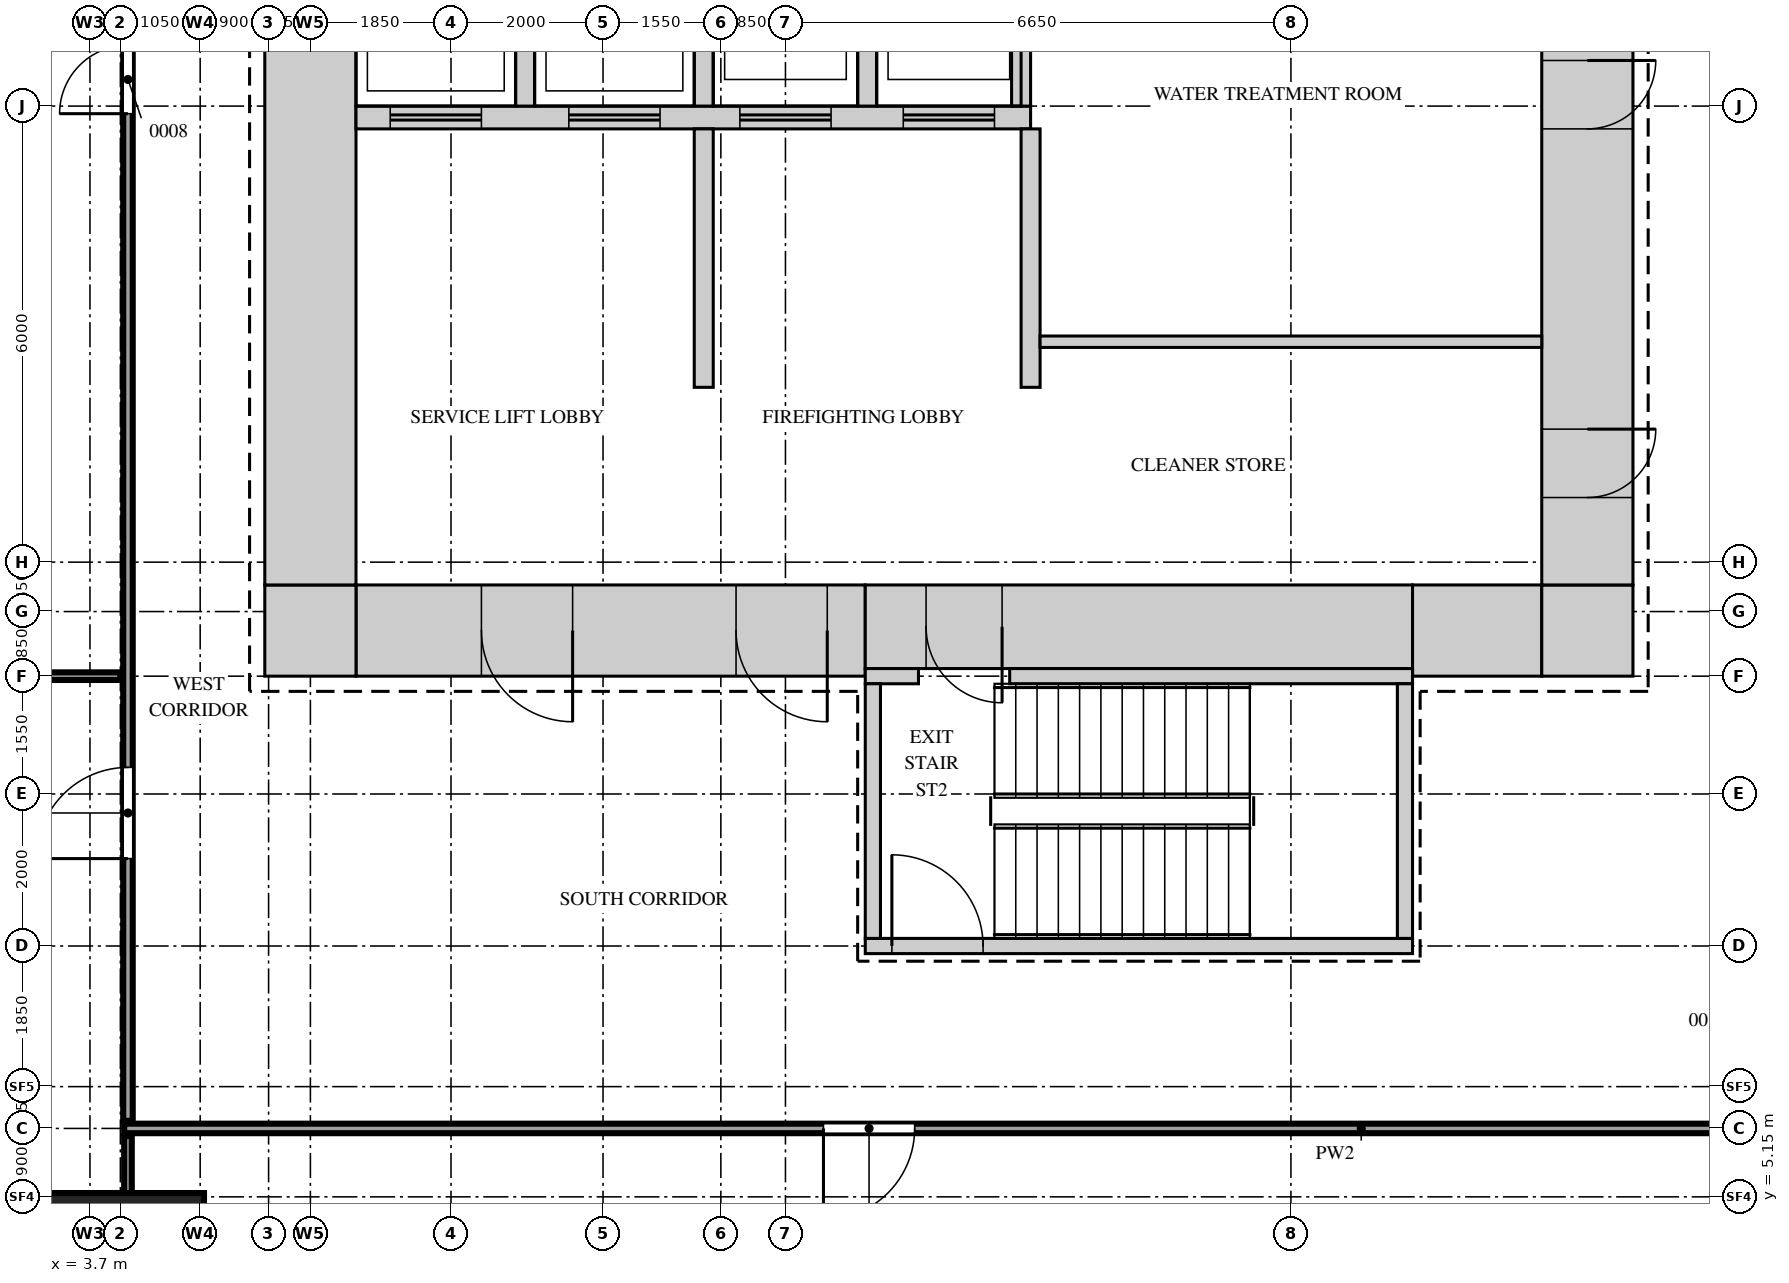
"""IFC4 building model, lengths in metres.
Left out: names, types, materials, properties, quantities, classifications, styles, units other than length and angle.
Written with IfcOpenShell. Run it as: python <this file> out.ifc"""

import sys

from ifc_helpers import new_model, si_unit, direction, frame, frame_2d, origin, origin_2d, place, context, subcontext, project, spatial, rectangle, extrude, source, transform, mapped, element, fill, save


model = new_model("IFC4")
c1 = context("Model", 3, precision=1e-05, world=origin(), true_north=direction((0.0, 1.0)))
c2 = subcontext(c1, "Body", "Model", "MODEL_VIEW")
j1 = project(units=[si_unit("LENGTHUNIT", "METRE"), si_unit("PLANEANGLEUNIT", "RADIAN")], contexts=[c1])
p1 = place(None, origin())
s1 = spatial("IfcSite", under=j1, at=p1, CompositionType="ELEMENT")
p2 = place(p1, origin())
s2 = spatial("IfcBuilding", under=s1, at=p2, CompositionType="ELEMENT")
p3 = place(p2, frame((0.0, 0.0, 73.5)))
s3 = spatial("IfcBuildingStorey", under=s2, at=p3, CompositionType="ELEMENT", Elevation=73.5)
m1 = source(origin(), c2, "Body", "SweptSolid", [
    extrude(rectangle(XDim=6.7, YDim=1.2, at=frame_2d((3.35, 0.0))), origin(), (0.0, 0.0, 1.0), 4.2),
])
p4 = place(p3, frame((7.2, 12.6, 0.0), z_axis=(0.0, 0.0, 1.0), x_axis=(1.0, 0.0, 0.0)))
e1 = element("IfcWall", 1, at=p4, inside=s3, PredefinedType="SHEAR", context=c2, shape_type="MappedRepresentation", body=[
    mapped(m1, transform((0.0, 0.0, 0.0))),
])
m2 = source(origin(), c2, "Body", "SweptSolid", [
    extrude(rectangle(XDim=1.2, YDim=2.1, at=frame_2d((0.6, 1.05))), frame((0.0, 0.61, 0.0), z_axis=(0.0, -1.0, 0.0), x_axis=(1.0, 0.0, 0.0)), (0.0, 0.0, 1.0), 1.22),
])
p5 = place(p4, frame((5.0, 0.0, 0.0)))
e2 = element("IfcOpeningElement", 2, at=p5, cuts=e1, PredefinedType="OPENING", context=c2, shape_type="MappedRepresentation", body=[
    mapped(m2, transform((0.0, 0.0, 0.0))),
])
p6 = place(p4, frame((1.65, 0.0, 0.0)))
e3 = element("IfcOpeningElement", 3, at=p6, cuts=e1, PredefinedType="OPENING", context=c2, shape_type="MappedRepresentation", body=[
    mapped(m2, transform((0.0, 0.0, 0.0))),
])
m3 = source(origin(), c2, "Body", "SweptSolid", [
    extrude(rectangle(XDim=7.2, YDim=1.1, at=frame_2d((3.6, 0.0))), origin(), (0.0, 0.0, 1.0), 4.2),
])
p7 = place(p3, frame((13.9, 12.65, 0.0), z_axis=(0.0, 0.0, 1.0), x_axis=(1.0, 0.0, 0.0)))
e4 = element("IfcWall", 4, at=p7, inside=s3, PredefinedType="SHEAR", context=c2, shape_type="MappedRepresentation", body=[
    mapped(m3, transform((0.0, 0.0, 0.0))),
])
m4 = source(origin(), c2, "Body", "SweptSolid", [
    extrude(rectangle(XDim=1.0, YDim=2.1, at=frame_2d((0.5, 1.05))), frame((0.0, 0.56, 0.0), z_axis=(0.0, -1.0, 0.0), x_axis=(1.0, 0.0, 0.0)), (0.0, 0.0, 1.0), 1.12),
])
p8 = place(p7, frame((0.8, 0.0, 0.0)))
e5 = element("IfcOpeningElement", 5, at=p8, cuts=e4, PredefinedType="OPENING", context=c2, shape_type="MappedRepresentation", body=[
    mapped(m4, transform((0.0, 0.0, 0.0))),
])
m5 = source(origin(), c2, "Body", "SweptSolid", [
    extrude(rectangle(XDim=1.7, YDim=1.2, at=frame_2d((0.85, 0.0))), origin(), (0.0, 0.0, 1.0), 4.2),
])
p9 = place(p3, frame((21.1, 12.6, 0.0), z_axis=(0.0, 0.0, 1.0), x_axis=(1.0, 0.0, 0.0)))
e6 = element("IfcWall", 6, at=p9, inside=s3, PredefinedType="SHEAR", context=c2, shape_type="MappedRepresentation", body=[
    mapped(m5, transform((0.0, 0.0, 0.0))),
])
m6 = source(origin(), c2, "Body", "SweptSolid", [
    extrude(rectangle(XDim=1.2, YDim=1.2, at=frame_2d((0.6, 0.0))), origin(), (0.0, 0.0, 1.0), 4.2),
])
for number, where, z_axis, x_axis in (
    (7, (22.8, 12.6, 0.0), (0.0, 0.0, 1.0), (1.0, 0.0, 0.0)),
    (8, (6.0, 12.6, 0.0), (0.0, 0.0, 1.0), (1.0, 0.0, 0.0)),
):
    element("IfcWall", number, at=place(p3, frame(where, z_axis=z_axis, x_axis=x_axis)), inside=s3, PredefinedType="SHEAR", context=c2, shape_type="MappedRepresentation", body=[
        mapped(m6, transform((0.0, 0.0, 0.0))),
    ])
m7 = source(origin(), c2, "Body", "SweptSolid", [
    extrude(rectangle(XDim=27.6, YDim=1.2, at=frame_2d((13.8, 0.0))), origin(), (0.0, 0.0, 1.0), 4.2),
])
p10 = place(p3, frame((23.4, 13.2, 0.0), z_axis=(0.0, 0.0, 1.0), x_axis=(0.0, 1.0, 0.0)))
e9 = element("IfcWall", 9, at=p10, inside=s3, PredefinedType="SHEAR", context=c2, shape_type="MappedRepresentation", body=[
    mapped(m7, transform((0.0, 0.0, 0.0))),
])
m8 = source(origin(), c2, "Body", "SweptSolid", [
    extrude(rectangle(XDim=1.8, YDim=2.1, at=frame_2d((0.9, 1.05))), frame((0.0, 0.61, 0.0), z_axis=(0.0, -1.0, 0.0), x_axis=(1.0, 0.0, 0.0)), (0.0, 0.0, 1.0), 1.22),
])
p11 = place(p10, frame((22.4, 0.0, 0.0)))
e10 = element("IfcOpeningElement", 10, at=p11, cuts=e9, PredefinedType="OPENING", context=c2, shape_type="MappedRepresentation", body=[
    mapped(m8, transform((0.0, 0.0, 0.0))),
])
p12 = place(p10, frame((14.4, 0.0, 0.0)))
e11 = element("IfcOpeningElement", 11, at=p12, cuts=e9, PredefinedType="OPENING", context=c2, shape_type="MappedRepresentation", body=[
    mapped(m2, transform((0.0, 0.0, 0.0))),
])
m9 = source(origin(), c2, "Body", "SweptSolid", [
    extrude(rectangle(XDim=0.9, YDim=2.1, at=frame_2d((0.45, 1.05))), frame((0.0, 0.61, 0.0), z_axis=(0.0, -1.0, 0.0), x_axis=(1.0, 0.0, 0.0)), (0.0, 0.0, 1.0), 1.22),
])
p13 = place(p10, frame((1.15, 0.0, 0.0)))
e12 = element("IfcOpeningElement", 12, at=p13, cuts=e9, PredefinedType="OPENING", context=c2, shape_type="MappedRepresentation", body=[
    mapped(m9, transform((0.0, 0.0, 0.0))),
])
p14 = place(p10, frame((6.0, 0.0, 0.0)))
e13 = element("IfcOpeningElement", 13, at=p14, cuts=e9, PredefinedType="OPENING", context=c2, shape_type="MappedRepresentation", body=[
    mapped(m9, transform((0.0, 0.0, 0.0))),
])
p15 = place(p3, frame((6.6, 13.2, 0.0), z_axis=(0.0, 0.0, 1.0), x_axis=(0.0, 1.0, 0.0)))
e14 = element("IfcWall", 14, at=p15, inside=s3, PredefinedType="SHEAR", context=c2, shape_type="MappedRepresentation", body=[
    mapped(m7, transform((0.0, 0.0, 0.0))),
])
m10 = source(origin(), c2, "Body", "SweptSolid", [
    extrude(rectangle(XDim=0.7, YDim=0.2, at=frame_2d((0.35, 0.0))), origin(), (0.0, 0.0, 1.0), 4.2),
])
p16 = place(p3, frame((13.9, 12.0, 0.0), z_axis=(0.0, 0.0, 1.0), x_axis=(1.0, 0.0, 0.0)))
e15 = element("IfcWall", 15, at=p16, inside=s3, PredefinedType="SHEAR", context=c2, shape_type="MappedRepresentation", body=[
    mapped(m10, transform((0.0, 0.0, 0.0))),
])
m11 = source(origin(), c2, "Body", "SweptSolid", [
    extrude(rectangle(XDim=5.3, YDim=0.2, at=frame_2d((2.65, 0.0))), origin(), (0.0, 0.0, 1.0), 4.2),
])
p17 = place(p3, frame((15.8, 12.0, 0.0), z_axis=(0.0, 0.0, 1.0), x_axis=(1.0, 0.0, 0.0)))
e16 = element("IfcWall", 16, at=p17, inside=s3, PredefinedType="SHEAR", context=c2, shape_type="MappedRepresentation", body=[
    mapped(m11, transform((0.0, 0.0, 0.0))),
])
m12 = source(origin(), c2, "Body", "SweptSolid", [
    extrude(rectangle(XDim=7.2, YDim=0.2, at=frame_2d((3.6, 0.0))), origin(), (0.0, 0.0, 1.0), 4.2),
])
p18 = place(p3, frame((13.9, 8.45, 0.0), z_axis=(0.0, 0.0, 1.0), x_axis=(1.0, 0.0, 0.0)))
e17 = element("IfcWall", 17, at=p18, inside=s3, PredefinedType="SHEAR", context=c2, shape_type="MappedRepresentation", body=[
    mapped(m12, transform((0.0, 0.0, 0.0))),
])
m13 = source(origin(), c2, "Body", "SweptSolid", [
    extrude(rectangle(XDim=1.2, YDim=2.1, at=frame_2d((0.6, 1.05))), frame((0.0, 0.11, 0.0), z_axis=(0.0, -1.0, 0.0), x_axis=(1.0, 0.0, 0.0)), (0.0, 0.0, 1.0), 0.22),
])
p19 = place(p18, frame((0.35, 0.0, 0.0)))
e18 = element("IfcOpeningElement", 18, at=p19, cuts=e17, PredefinedType="OPENING", context=c2, shape_type="MappedRepresentation", body=[
    mapped(m13, transform((0.0, 0.0, 0.0))),
])
m14 = source(origin(), c2, "Body", "SweptSolid", [
    extrude(rectangle(XDim=3.35, YDim=0.2, at=frame_2d((1.675, 0.0))), origin(), (0.0, 0.0, 1.0), 4.2),
])
for number, where, z_axis, x_axis in (
    (19, (21.0, 8.55, 0.0), (0.0, 0.0, 1.0), (0.0, 1.0, 0.0)),
    (20, (14.0, 8.55, 0.0), (0.0, 0.0, 1.0), (0.0, 1.0, 0.0)),
):
    element("IfcWall", number, at=place(p3, frame(where, z_axis=z_axis, x_axis=x_axis)), inside=s3, PredefinedType="SHEAR", context=c2, shape_type="MappedRepresentation", body=[
        mapped(m14, transform((0.0, 0.0, 0.0))),
    ])
m15 = source(origin(), c2, "Body", "SweptSolid", [
    extrude(rectangle(XDim=8.875, YDim=0.3, at=frame_2d((4.438, 0.0))), origin(), (0.0, 0.0, 1.0), 4.2),
])
p20 = place(p3, frame((7.2, 19.35, 0.0), z_axis=(0.0, 0.0, 1.0), x_axis=(1.0, 0.0, 0.0)))
e21 = element("IfcWall", 21, at=p20, inside=s3, PredefinedType="STANDARD", context=c2, shape_type="MappedRepresentation", body=[
    mapped(m15, transform((0.0, 0.0, 0.0))),
])
m16 = source(origin(), c2, "Body", "SweptSolid", [
    extrude(rectangle(XDim=1.2, YDim=2.1, at=frame_2d((0.6, 1.05))), frame((0.0, 0.16, 0.0), z_axis=(0.0, -1.0, 0.0), x_axis=(1.0, 0.0, 0.0)), (0.0, 0.0, 1.0), 0.32),
])
p21 = place(p20, frame((0.45, 0.0, 0.0)))
e22 = element("IfcOpeningElement", 22, at=p21, cuts=e21, PredefinedType="OPENING", context=c2, shape_type="MappedRepresentation", body=[
    mapped(m16, transform((0.0, 0.0, 0.0))),
])
p22 = place(p20, frame((2.8, 0.0, 0.0)))
e23 = element("IfcOpeningElement", 23, at=p22, cuts=e21, PredefinedType="OPENING", context=c2, shape_type="MappedRepresentation", body=[
    mapped(m16, transform((0.0, 0.0, 0.0))),
])
p23 = place(p20, frame((5.05, 0.0, 0.0)))
e24 = element("IfcOpeningElement", 24, at=p23, cuts=e21, PredefinedType="OPENING", context=c2, shape_type="MappedRepresentation", body=[
    mapped(m16, transform((0.0, 0.0, 0.0))),
])
p24 = place(p20, frame((7.2, 0.0, 0.0)))
e25 = element("IfcOpeningElement", 25, at=p24, cuts=e21, PredefinedType="OPENING", context=c2, shape_type="MappedRepresentation", body=[
    mapped(m16, transform((0.0, 0.0, 0.0))),
])
m17 = source(origin(), c2, "Body", "SweptSolid", [
    extrude(rectangle(XDim=3.1, YDim=0.25, at=frame_2d((1.55, 0.0))), origin(), (0.0, 0.0, 1.0), 4.2),
])
for number, where, z_axis, x_axis in (
    (26, (9.425, 19.5, 0.0), (0.0, 0.0, 1.0), (0.0, 1.0, 0.0)),
    (27, (11.775, 19.5, 0.0), (0.0, 0.0, 1.0), (0.0, 1.0, 0.0)),
    (28, (13.925, 19.5, 0.0), (0.0, 0.0, 1.0), (0.0, 1.0, 0.0)),
    (29, (15.95, 19.5, 0.0), (0.0, 0.0, 1.0), (0.0, 1.0, 0.0)),
):
    element("IfcWall", number, at=place(p3, frame(where, z_axis=z_axis, x_axis=x_axis)), inside=s3, PredefinedType="STANDARD", context=c2, shape_type="MappedRepresentation", body=[
        mapped(m17, transform((0.0, 0.0, 0.0))),
    ])
m18 = source(origin(), c2, "Body", "SweptSolid", [
    extrude(rectangle(XDim=3.4, YDim=0.25, at=frame_2d((1.7, 0.0))), origin(), (0.0, 0.0, 1.0), 4.2),
])
for number, where, z_axis, x_axis in (
    (30, (16.075, 15.8, 0.0), (0.0, 0.0, 1.0), (0.0, 1.0, 0.0)),
    (31, (11.775, 15.8, 0.0), (0.0, 0.0, 1.0), (0.0, 1.0, 0.0)),
):
    element("IfcWall", number, at=place(p3, frame(where, z_axis=z_axis, x_axis=x_axis)), inside=s3, PredefinedType="STANDARD", context=c2, shape_type="MappedRepresentation", body=[
        mapped(m18, transform((0.0, 0.0, 0.0))),
    ])
m19 = source(origin(), c2, "Body", "SweptSolid", [
    extrude(rectangle(XDim=2.2, YDim=2.2, at=origin_2d()), origin(), (0.0, 0.0, 1.0), 4.5),
])
p25 = place(p3, frame((4.1, 4.1, 0.0), z_axis=(0.0, 0.0, 1.0), x_axis=(1.0, 0.0, 0.0)))
e32 = element("IfcColumn", 32, at=p25, inside=s3, PredefinedType="COLUMN", context=c2, shape_type="MappedRepresentation", body=[
    mapped(m19, transform((0.0, 0.0, 0.0))),
])
m20 = source(origin(), c2, "Body", "SweptSolid", [
    extrude(rectangle(XDim=5.8, YDim=0.1, at=frame_2d((2.9, 0.0))), origin(), (0.0, 0.0, 1.0), 3.6),
])
p26 = place(p3, frame((4.2, 0.15, 0.0), z_axis=(0.0, 0.0, 1.0), x_axis=(0.0, 1.0, 0.0)))
e33 = element("IfcWall", 33, at=p26, inside=s3, PredefinedType="PARTITIONING", context=c2, shape_type="MappedRepresentation", body=[
    mapped(m20, transform((0.0, 0.0, 0.0))),
])
m21 = source(origin(), c2, "Body", "SweptSolid", [
    extrude(rectangle(XDim=22.15, YDim=0.125, at=frame_2d((11.075, 0.0))), origin(), (0.0, 0.0, 1.0), 4.3),
])
p27 = place(p3, frame((4.15, 6.05, 0.0), z_axis=(0.0, 0.0, 1.0), x_axis=(1.0, 0.0, 0.0)))
e34 = element("IfcWall", 34, at=p27, inside=s3, PredefinedType="PARTITIONING", context=c2, shape_type="MappedRepresentation", body=[
    mapped(m21, transform((0.0, 0.0, 0.0))),
])
m22 = source(origin(), c2, "Body", "SweptSolid", [
    extrude(rectangle(XDim=1.2, YDim=2.1, at=frame_2d((0.6, 1.05))), frame((0.0, 0.073, 0.0), z_axis=(0.0, -1.0, 0.0), x_axis=(1.0, 0.0, 0.0)), (0.0, 0.0, 1.0), 0.145),
])
p28 = place(p27, frame((9.2, 0.0, 0.0)))
e35 = element("IfcOpeningElement", 35, at=p28, cuts=e34, PredefinedType="OPENING", context=c2, shape_type="MappedRepresentation", body=[
    mapped(m22, transform((0.0, 0.0, 0.0))),
])
m23 = source(origin(), c2, "Body", "SweptSolid", [
    extrude(rectangle(XDim=41.8, YDim=0.125, at=frame_2d((20.9, 0.0))), origin(), (0.0, 0.0, 1.0), 4.3),
])
p29 = place(p3, frame((4.2, 6.15, 0.0), z_axis=(0.0, 0.0, 1.0), x_axis=(0.0, 1.0, 0.0)))
e36 = element("IfcWall", 36, at=p29, inside=s3, PredefinedType="PARTITIONING", context=c2, shape_type="MappedRepresentation", body=[
    mapped(m23, transform((0.0, 0.0, 0.0))),
])
p30 = place(p29, frame((3.45, 0.0, 0.0)))
e37 = element("IfcOpeningElement", 37, at=p30, cuts=e36, PredefinedType="OPENING", context=c2, shape_type="MappedRepresentation", body=[
    mapped(m22, transform((0.0, 0.0, 0.0))),
])
m24 = source(origin(), c2, "Body", "SweptSolid", [
    extrude(rectangle(XDim=0.9, YDim=2.1, at=frame_2d((0.45, 1.05))), frame((0.0, 0.073, 0.0), z_axis=(0.0, -1.0, 0.0), x_axis=(1.0, 0.0, 0.0)), (0.0, 0.0, 1.0), 0.145),
])
p31 = place(p29, frame((13.25, 0.0, 0.0)))
e38 = element("IfcOpeningElement", 38, at=p31, cuts=e36, PredefinedType="OPENING", context=c2, shape_type="MappedRepresentation", body=[
    mapped(m24, transform((0.0, 0.0, 0.0))),
])
p32 = place(p29, frame((30.35, 0.0, 0.0)))
e39 = element("IfcOpeningElement", 39, at=p32, cuts=e36, PredefinedType="OPENING", context=c2, shape_type="MappedRepresentation", body=[
    mapped(m24, transform((0.0, 0.0, 0.0))),
])
m25 = source(origin(), c2, "Body", "SweptSolid", [
    extrude(rectangle(XDim=3.95, YDim=0.1, at=frame_2d((1.975, 0.0))), origin(), (0.0, 0.0, 1.0), 4.3),
])
p33 = place(p3, frame((0.15, 12.0, 0.0), z_axis=(0.0, 0.0, 1.0), x_axis=(1.0, 0.0, 0.0)))
e40 = element("IfcWall", 40, at=p33, inside=s3, PredefinedType="PARTITIONING", context=c2, shape_type="MappedRepresentation", body=[
    mapped(m25, transform((0.0, 0.0, 0.0))),
])
m26 = source(origin(), c2, "Body", "SweptSolid", [
    extrude(rectangle(XDim=6.6, YDim=0.15, at=frame_2d((3.3, 0.0))), origin(), (0.0, 0.0, 1.0), 4.3),
])
p34 = place(p3, frame((16.2, 16.4, 0.0), z_axis=(0.0, 0.0, 1.0), x_axis=(1.0, 0.0, 0.0)))
e41 = element("IfcWall", 41, at=p34, inside=s3, PredefinedType="PARTITIONING", context=c2, shape_type="MappedRepresentation", body=[
    mapped(m26, transform((0.0, 0.0, 0.0))),
])
m27 = source(origin(), c2, "Body", "SweptSolid", [
    extrude(rectangle(XDim=0.9, YDim=2.1, at=frame_2d((0.45, 1.05))), frame((0.0, 0.55, 0.0), z_axis=(0.0, -1.0, 0.0), x_axis=(1.0, 0.0, 0.0)), (0.0, 0.0, 1.0), 1.1),
])
p35 = place(p13, origin())
e42 = element("IfcDoor", 42, at=p35, inside=s3, OperationType="SINGLE_SWING_RIGHT", PredefinedType="DOOR", context=c2, shape_type="MappedRepresentation", body=[
    mapped(m27, transform((0.0, 0.0, 0.0))),
])
fill(e12, e42)
p36 = place(p14, origin())
e43 = element("IfcDoor", 43, at=p36, inside=s3, OperationType="SINGLE_SWING_RIGHT", PredefinedType="DOOR", context=c2, shape_type="MappedRepresentation", body=[
    mapped(m27, transform((0.0, 0.0, 0.0))),
])
fill(e13, e43)
m28 = source(origin(), c2, "Body", "SweptSolid", [
    extrude(rectangle(XDim=1.2, YDim=2.1, at=frame_2d((0.6, 1.05))), frame((0.0, 0.55, 0.0), z_axis=(0.0, -1.0, 0.0), x_axis=(1.0, 0.0, 0.0)), (0.0, 0.0, 1.0), 1.1),
])
p37 = place(p5, origin())
e44 = element("IfcDoor", 44, at=p37, inside=s3, OperationType="SINGLE_SWING_RIGHT", PredefinedType="DOOR", context=c2, shape_type="MappedRepresentation", body=[
    mapped(m28, transform((0.0, 0.0, 0.0))),
])
fill(e2, e44)
p38 = place(p6, origin())
e45 = element("IfcDoor", 45, at=p38, inside=s3, OperationType="SINGLE_SWING_RIGHT", PredefinedType="DOOR", context=c2, shape_type="MappedRepresentation", body=[
    mapped(m28, transform((0.0, 0.0, 0.0))),
])
fill(e3, e45)
m29 = source(origin(), c2, "Body", "SweptSolid", [
    extrude(rectangle(XDim=1.0, YDim=2.1, at=frame_2d((0.5, 1.05))), frame((0.0, 0.5, 0.0), z_axis=(0.0, -1.0, 0.0), x_axis=(1.0, 0.0, 0.0)), (0.0, 0.0, 1.0), 1.0),
])
p39 = place(p8, origin())
e46 = element("IfcDoor", 46, at=p39, inside=s3, OperationType="SINGLE_SWING_RIGHT", PredefinedType="DOOR", context=c2, shape_type="MappedRepresentation", body=[
    mapped(m29, transform((0.0, 0.0, 0.0))),
])
fill(e5, e46)
m30 = source(origin(), c2, "Body", "SweptSolid", [
    extrude(rectangle(XDim=1.2, YDim=2.1, at=frame_2d((0.6, 1.05))), frame((0.0, 0.025, 0.0), z_axis=(0.0, -1.0, 0.0), x_axis=(1.0, 0.0, 0.0)), (0.0, 0.0, 1.0), 0.05),
])
p40 = place(p30, origin())
e47 = element("IfcDoor", 47, at=p40, inside=s3, OperationType="SINGLE_SWING_RIGHT", PredefinedType="DOOR", context=c2, shape_type="MappedRepresentation", body=[
    mapped(m30, transform((0.0, 0.0, 0.0))),
])
fill(e37, e47)
m31 = source(origin(), c2, "Body", "SweptSolid", [
    extrude(rectangle(XDim=0.9, YDim=2.1, at=frame_2d((0.45, 1.05))), frame((0.0, 0.025, 0.0), z_axis=(0.0, -1.0, 0.0), x_axis=(1.0, 0.0, 0.0)), (0.0, 0.0, 1.0), 0.05),
])
p41 = place(p31, origin())
e48 = element("IfcDoor", 48, at=p41, inside=s3, OperationType="SINGLE_SWING_RIGHT", PredefinedType="DOOR", context=c2, shape_type="MappedRepresentation", body=[
    mapped(m31, transform((0.0, 0.0, 0.0))),
])
fill(e38, e48)
p42 = place(p28, origin())
e49 = element("IfcDoor", 49, at=p42, inside=s3, OperationType="SINGLE_SWING_LEFT", PredefinedType="DOOR", context=c2, shape_type="MappedRepresentation", body=[
    mapped(m30, transform((0.0, 0.0, 0.0))),
])
fill(e35, e49)
p43 = place(p19, origin())
e50 = element("IfcDoor", 50, at=p43, inside=s3, OperationType="SINGLE_SWING_RIGHT", PredefinedType="DOOR", context=c2, shape_type="MappedRepresentation", body=[
    mapped(m30, transform((0.0, 0.0, 0.0))),
])
fill(e18, e50)
p44 = place(p21, origin())
e51 = element("IfcDoor", 51, at=p44, inside=s3, OperationType="DOUBLE_DOOR_SLIDING", PredefinedType="DOOR", context=c2, shape_type="MappedRepresentation", body=[
    mapped(m30, transform((0.0, 0.0, 0.0))),
])
fill(e22, e51)
p45 = place(p22, origin())
e52 = element("IfcDoor", 52, at=p45, inside=s3, OperationType="DOUBLE_DOOR_SLIDING", PredefinedType="DOOR", context=c2, shape_type="MappedRepresentation", body=[
    mapped(m30, transform((0.0, 0.0, 0.0))),
])
fill(e23, e52)
p46 = place(p23, origin())
e53 = element("IfcDoor", 53, at=p46, inside=s3, OperationType="DOUBLE_DOOR_SLIDING", PredefinedType="DOOR", context=c2, shape_type="MappedRepresentation", body=[
    mapped(m30, transform((0.0, 0.0, 0.0))),
])
fill(e24, e53)
p47 = place(p24, origin())
e54 = element("IfcDoor", 54, at=p47, inside=s3, OperationType="DOUBLE_DOOR_SLIDING", PredefinedType="DOOR", context=c2, shape_type="MappedRepresentation", body=[
    mapped(m30, transform((0.0, 0.0, 0.0))),
])
fill(e25, e54)
save(model, sys.argv[1])
